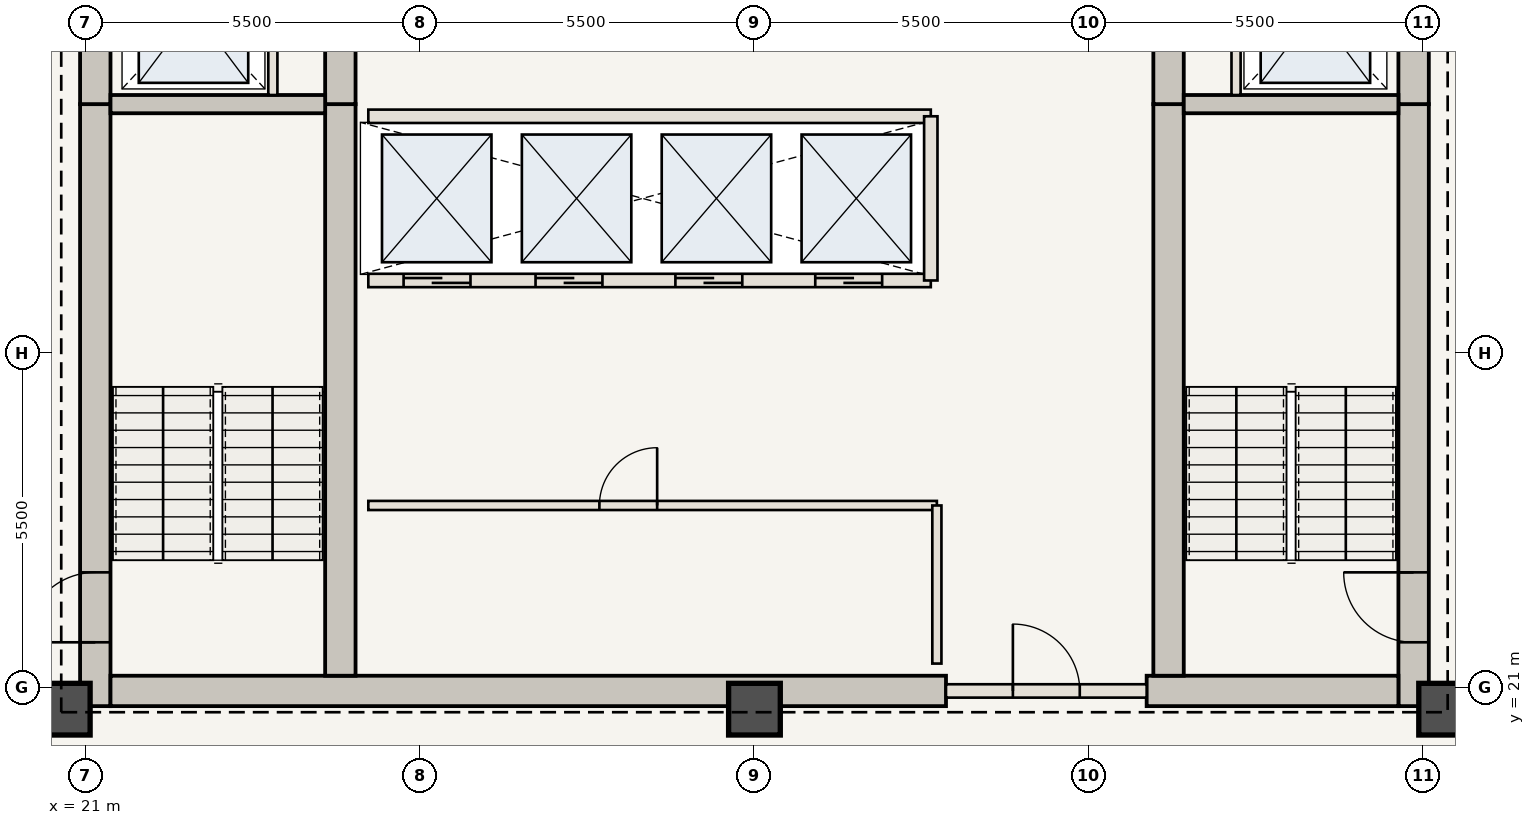
"""IFC4 building model, lengths in metres.
Left out: names, types, materials, properties, quantities, classifications, styles, units other than length and angle.
Written with IfcOpenShell. Run it as: python <this file> out.ifc"""

import sys

from ifc_helpers import new_model, si_unit, direction, frame, frame_2d, origin, origin_2d, place, context, subcontext, project, spatial, rectangle, extrude, element, fill, save


model = new_model("IFC4")
c1 = context("Model", 3, precision=1e-05, world=origin(), true_north=direction((0.0, 1.0)))
c2 = subcontext(c1, "Body", "Model", "MODEL_VIEW")
j1 = project(units=[si_unit("LENGTHUNIT", "METRE"), si_unit("PLANEANGLEUNIT", "RADIAN")], contexts=[c1])
p1 = place(None, origin())
s1 = spatial("IfcSite", under=j1, at=p1, CompositionType="ELEMENT")
p2 = place(p1, origin())
s2 = spatial("IfcBuilding", under=s1, at=p2, CompositionType="ELEMENT")
p3 = place(p2, frame((0.0, 0.0, 225.4)))
s3 = spatial("IfcBuildingStorey", under=s2, at=p3, CompositionType="ELEMENT", Elevation=225.4)
p4 = place(p3, frame((21.16, 20.7, 0.0), z_axis=(0.0, 0.0, 1.0), x_axis=(0.0, 1.0, 0.0)))
e1 = element("IfcWall", 1, at=p4, inside=s3, PredefinedType="SHEAR", context=c2, shape_type="SweptSolid", body=[
    extrude(rectangle(XDim=9.9, YDim=0.5, at=frame_2d((4.95, 0.0))), origin(), (0.0, 0.0, 1.0), 3.85),
])
p5 = place(p4, frame((1.05, 0.0, 0.0)))
e2 = element("IfcOpeningElement", 2, at=p5, cuts=e1, PredefinedType="OPENING", context=c2, shape_type="SweptSolid", body=[
    extrude(rectangle(XDim=1.15, YDim=2.15, at=frame_2d((0.575, 1.075))), frame((0.0, 0.26, 0.0), z_axis=(0.0, -1.0, 0.0), x_axis=(1.0, 0.0, 0.0)), (0.0, 0.0, 1.0), 0.52),
])
p6 = place(p3, frame((21.16, 30.6, 0.0), z_axis=(0.0, 0.0, 1.0), x_axis=(0.0, 1.0, 0.0)))
e3 = element("IfcWall", 3, at=p6, inside=s3, PredefinedType="SHEAR", context=c2, shape_type="SweptSolid", body=[
    extrude(rectangle(XDim=12.65, YDim=0.5, at=frame_2d((6.325, 0.0))), origin(), (0.0, 0.0, 1.0), 3.85),
])
p7 = place(p6, frame((4.2, 0.0, 0.0)))
e4 = element("IfcOpeningElement", 4, at=p7, cuts=e3, PredefinedType="OPENING", context=c2, shape_type="SweptSolid", body=[
    extrude(rectangle(XDim=1.1, YDim=2.15, at=frame_2d((0.55, 1.075))), frame((0.0, 0.26, 0.0), z_axis=(0.0, -1.0, 0.0), x_axis=(1.0, 0.0, 0.0)), (0.0, 0.0, 1.0), 0.52),
])
p8 = place(p6, frame((9.2, 0.0, 0.0)))
e5 = element("IfcOpeningElement", 5, at=p8, cuts=e3, PredefinedType="OPENING", context=c2, shape_type="SweptSolid", body=[
    extrude(rectangle(XDim=0.92, YDim=2.1, at=frame_2d((0.46, 1.05))), frame((0.0, 0.26, 0.0), z_axis=(0.0, -1.0, 0.0), x_axis=(1.0, 0.0, 0.0)), (0.0, 0.0, 1.0), 0.52),
])
p9 = place(p3, frame((42.84, 20.7, 0.0), z_axis=(0.0, 0.0, 1.0), x_axis=(0.0, 1.0, 0.0)))
e6 = element("IfcWall", 6, at=p9, inside=s3, PredefinedType="SHEAR", context=c2, shape_type="SweptSolid", body=[
    extrude(rectangle(XDim=9.9, YDim=0.5, at=frame_2d((4.95, 0.0))), origin(), (0.0, 0.0, 1.0), 3.85),
])
p10 = place(p9, frame((1.05, 0.0, 0.0)))
e7 = element("IfcOpeningElement", 7, at=p10, cuts=e6, PredefinedType="OPENING", context=c2, shape_type="SweptSolid", body=[
    extrude(rectangle(XDim=1.15, YDim=2.15, at=frame_2d((0.575, 1.075))), frame((0.0, 0.26, 0.0), z_axis=(0.0, -1.0, 0.0), x_axis=(1.0, 0.0, 0.0)), (0.0, 0.0, 1.0), 0.52),
])
p11 = place(p3, frame((42.84, 30.6, 0.0), z_axis=(0.0, 0.0, 1.0), x_axis=(0.0, 1.0, 0.0)))
e8 = element("IfcWall", 8, at=p11, inside=s3, PredefinedType="SHEAR", context=c2, shape_type="SweptSolid", body=[
    extrude(rectangle(XDim=12.65, YDim=0.5, at=frame_2d((6.325, 0.0))), origin(), (0.0, 0.0, 1.0), 3.85),
])
p12 = place(p11, frame((4.2, 0.0, 0.0)))
e9 = element("IfcOpeningElement", 9, at=p12, cuts=e8, PredefinedType="OPENING", context=c2, shape_type="SweptSolid", body=[
    extrude(rectangle(XDim=1.1, YDim=2.15, at=frame_2d((0.55, 1.075))), frame((0.0, 0.26, 0.0), z_axis=(0.0, -1.0, 0.0), x_axis=(1.0, 0.0, 0.0)), (0.0, 0.0, 1.0), 0.52),
])
p13 = place(p11, frame((8.05, 0.0, 0.0)))
e10 = element("IfcOpeningElement", 10, at=p13, cuts=e8, PredefinedType="OPENING", context=c2, shape_type="SweptSolid", body=[
    extrude(rectangle(XDim=0.88, YDim=2.1, at=frame_2d((0.44, 1.05))), frame((0.0, 0.26, 0.0), z_axis=(0.0, -1.0, 0.0), x_axis=(1.0, 0.0, 0.0)), (0.0, 0.0, 1.0), 0.52),
])
p14 = place(p11, frame((9.45, 0.0, 0.0)))
e11 = element("IfcOpeningElement", 11, at=p14, cuts=e8, PredefinedType="OPENING", context=c2, shape_type="SweptSolid", body=[
    extrude(rectangle(XDim=0.88, YDim=2.1, at=frame_2d((0.44, 1.05))), frame((0.0, 0.26, 0.0), z_axis=(0.0, -1.0, 0.0), x_axis=(1.0, 0.0, 0.0)), (0.0, 0.0, 1.0), 0.52),
])
p15 = place(p11, frame((10.85, 0.0, 0.0)))
e12 = element("IfcOpeningElement", 12, at=p15, cuts=e8, PredefinedType="OPENING", context=c2, shape_type="SweptSolid", body=[
    extrude(rectangle(XDim=0.88, YDim=2.1, at=frame_2d((0.44, 1.05))), frame((0.0, 0.26, 0.0), z_axis=(0.0, -1.0, 0.0), x_axis=(1.0, 0.0, 0.0)), (0.0, 0.0, 1.0), 0.52),
])
p16 = place(p3, frame((21.41, 20.95, 0.0), z_axis=(0.0, 0.0, 1.0), x_axis=(1.0, 0.0, 0.0)))
e13 = element("IfcWall", 13, at=p16, inside=s3, PredefinedType="SHEAR", context=c2, shape_type="SweptSolid", body=[
    extrude(rectangle(XDim=13.74, YDim=0.5, at=frame_2d((6.87, 0.0))), origin(), (0.0, 0.0, 1.0), 3.85),
])
p17 = place(p3, frame((38.45, 20.95, 0.0), z_axis=(0.0, 0.0, 1.0), x_axis=(1.0, 0.0, 0.0)))
e14 = element("IfcWall", 14, at=p17, inside=s3, PredefinedType="SHEAR", context=c2, shape_type="SweptSolid", body=[
    extrude(rectangle(XDim=4.14, YDim=0.5, at=frame_2d((2.07, 0.0))), origin(), (0.0, 0.0, 1.0), 3.85),
])
p18 = place(p3, frame((25.19, 21.2, 0.0), z_axis=(0.0, 0.0, 1.0), x_axis=(0.0, 1.0, 0.0)))
e15 = element("IfcWall", 15, at=p18, inside=s3, PredefinedType="SHEAR", context=c2, shape_type="SweptSolid", body=[
    extrude(rectangle(XDim=9.4, YDim=0.5, at=frame_2d((4.7, 0.0))), origin(), (0.0, 0.0, 1.0), 3.85),
])
p19 = place(p3, frame((25.19, 30.6, 0.0), z_axis=(0.0, 0.0, 1.0), x_axis=(0.0, 1.0, 0.0)))
e16 = element("IfcWall", 16, at=p19, inside=s3, PredefinedType="SHEAR", context=c2, shape_type="SweptSolid", body=[
    extrude(rectangle(XDim=12.15, YDim=0.5, at=frame_2d((6.075, 0.0))), origin(), (0.0, 0.0, 1.0), 3.85),
])
p20 = place(p19, frame((6.25, 0.0, 0.0)))
e17 = element("IfcOpeningElement", 17, at=p20, cuts=e16, PredefinedType="OPENING", context=c2, shape_type="SweptSolid", body=[
    extrude(rectangle(XDim=1.1, YDim=2.15, at=frame_2d((0.55, 1.075))), frame((0.0, 0.26, 0.0), z_axis=(0.0, -1.0, 0.0), x_axis=(1.0, 0.0, 0.0)), (0.0, 0.0, 1.0), 0.52),
])
p21 = place(p3, frame((38.81, 21.2, 0.0), z_axis=(0.0, 0.0, 1.0), x_axis=(0.0, 1.0, 0.0)))
e18 = element("IfcWall", 18, at=p21, inside=s3, PredefinedType="SHEAR", context=c2, shape_type="SweptSolid", body=[
    extrude(rectangle(XDim=9.4, YDim=0.5, at=frame_2d((4.7, 0.0))), origin(), (0.0, 0.0, 1.0), 3.85),
])
p22 = place(p3, frame((38.81, 30.6, 0.0), z_axis=(0.0, 0.0, 1.0), x_axis=(0.0, 1.0, 0.0)))
e19 = element("IfcWall", 19, at=p22, inside=s3, PredefinedType="SHEAR", context=c2, shape_type="SweptSolid", body=[
    extrude(rectangle(XDim=12.15, YDim=0.5, at=frame_2d((6.075, 0.0))), origin(), (0.0, 0.0, 1.0), 3.85),
])
for number, where, z_axis, x_axis in (
    (20, (20.65, 20.65, 0.0), (0.0, 0.0, 1.0), (1.0, 0.0, 0.0)),
    (21, (32.0, 20.65, 0.0), (0.0, 0.0, 1.0), (1.0, 0.0, 0.0)),
    (22, (43.35, 20.65, 0.0), (0.0, 0.0, 1.0), (1.0, 0.0, 0.0)),
):
    element("IfcColumn", number, at=place(p3, frame(where, z_axis=z_axis, x_axis=x_axis)), inside=s3, PredefinedType="COLUMN", context=c2, shape_type="SweptSolid", body=[
        extrude(rectangle(XDim=0.85, YDim=0.85, at=origin_2d()), origin(), (0.0, 0.0, 1.0), 3.85),
    ])
for number, where, z_axis, x_axis in (
    (23, (21.41, 30.6, 0.0), (0.0, 0.0, 1.0), (1.0, 0.0, 0.0)),
    (24, (39.06, 30.6, 0.0), (0.0, 0.0, 1.0), (1.0, 0.0, 0.0)),
):
    element("IfcWall", number, at=place(p3, frame(where, z_axis=z_axis, x_axis=x_axis)), inside=s3, PredefinedType="SHEAR", context=c2, shape_type="SweptSolid", body=[
        extrude(rectangle(XDim=3.53, YDim=0.3, at=frame_2d((1.765, 0.0))), origin(), (0.0, 0.0, 1.0), 3.685),
    ])
for number, where, z_axis, x_axis in (
    (25, (24.08, 30.75, 0.0), (0.0, 0.0, 1.0), (0.0, 1.0, 0.0)),
    (26, (39.92, 30.75, 0.0), (0.0, 0.0, 1.0), (0.0, 1.0, 0.0)),
):
    element("IfcWall", number, at=place(p3, frame(where, z_axis=z_axis, x_axis=x_axis)), inside=s3, PredefinedType="STANDARD", context=c2, shape_type="SweptSolid", body=[
        extrude(rectangle(XDim=2.65, YDim=0.15, at=frame_2d((1.325, 0.0))), origin(), (0.0, 0.0, 1.0), 3.685),
    ])
p23 = place(p3, frame((35.15, 20.95, 0.0), z_axis=(0.0, 0.0, 1.0), x_axis=(1.0, 0.0, 0.0)))
e27 = element("IfcWall", 27, at=p23, inside=s3, PredefinedType="STANDARD", context=c2, shape_type="SweptSolid", body=[
    extrude(rectangle(XDim=3.3, YDim=0.22, at=frame_2d((1.65, 0.0))), origin(), (0.0, 0.0, 1.0), 3.685),
])
p24 = place(p23, frame((1.1, 0.0, 0.0)))
e28 = element("IfcOpeningElement", 28, at=p24, cuts=e27, PredefinedType="OPENING", context=c2, shape_type="SweptSolid", body=[
    extrude(rectangle(XDim=1.1, YDim=2.15, at=frame_2d((0.55, 1.075))), frame((0.0, 0.12, 0.0), z_axis=(0.0, -1.0, 0.0), x_axis=(1.0, 0.0, 0.0)), (0.0, 0.0, 1.0), 0.24),
])
p25 = place(p3, frame((25.65, 24.0, 0.0), z_axis=(0.0, 0.0, 1.0), x_axis=(1.0, 0.0, 0.0)))
e29 = element("IfcWall", 29, at=p25, inside=s3, PredefinedType="STANDARD", context=c2, shape_type="SweptSolid", body=[
    extrude(rectangle(XDim=9.35, YDim=0.15, at=frame_2d((4.675, 0.0))), origin(), (0.0, 0.0, 1.0), 3.685),
])
p26 = place(p25, frame((3.8, 0.0, 0.0)))
e30 = element("IfcOpeningElement", 30, at=p26, cuts=e29, PredefinedType="OPENING", context=c2, shape_type="SweptSolid", body=[
    extrude(rectangle(XDim=0.95, YDim=2.15, at=frame_2d((0.475, 1.075))), frame((0.0, 0.085, 0.0), z_axis=(0.0, -1.0, 0.0), x_axis=(1.0, 0.0, 0.0)), (0.0, 0.0, 1.0), 0.17),
])
p27 = place(p3, frame((35.0, 21.4, 0.0), z_axis=(0.0, 0.0, 1.0), x_axis=(0.0, 1.0, 0.0)))
e31 = element("IfcWall", 31, at=p27, inside=s3, PredefinedType="STANDARD", context=c2, shape_type="SweptSolid", body=[
    extrude(rectangle(XDim=2.6, YDim=0.15, at=frame_2d((1.3, 0.0))), origin(), (0.0, 0.0, 1.0), 3.685),
])
p28 = place(p3, frame((25.65, 27.7, 0.0), z_axis=(0.0, 0.0, 1.0), x_axis=(1.0, 0.0, 0.0)))
e32 = element("IfcWall", 32, at=p28, inside=s3, PredefinedType="STANDARD", context=c2, shape_type="SweptSolid", body=[
    extrude(rectangle(XDim=9.25, YDim=0.22, at=frame_2d((4.625, 0.0))), origin(), (0.0, 0.0, 1.0), 3.685),
])
p29 = place(p28, frame((0.58, 0.0, 0.0)))
e33 = element("IfcOpeningElement", 33, at=p29, cuts=e32, PredefinedType="OPENING", context=c2, shape_type="SweptSolid", body=[
    extrude(rectangle(XDim=1.1, YDim=2.15, at=frame_2d((0.55, 1.075))), frame((0.0, 0.12, 0.0), z_axis=(0.0, -1.0, 0.0), x_axis=(1.0, 0.0, 0.0)), (0.0, 0.0, 1.0), 0.24),
])
p30 = place(p28, frame((2.75, 0.0, 0.0)))
e34 = element("IfcOpeningElement", 34, at=p30, cuts=e32, PredefinedType="OPENING", context=c2, shape_type="SweptSolid", body=[
    extrude(rectangle(XDim=1.1, YDim=2.15, at=frame_2d((0.55, 1.075))), frame((0.0, 0.12, 0.0), z_axis=(0.0, -1.0, 0.0), x_axis=(1.0, 0.0, 0.0)), (0.0, 0.0, 1.0), 0.24),
])
p31 = place(p28, frame((5.05, 0.0, 0.0)))
e35 = element("IfcOpeningElement", 35, at=p31, cuts=e32, PredefinedType="OPENING", context=c2, shape_type="SweptSolid", body=[
    extrude(rectangle(XDim=1.1, YDim=2.15, at=frame_2d((0.55, 1.075))), frame((0.0, 0.12, 0.0), z_axis=(0.0, -1.0, 0.0), x_axis=(1.0, 0.0, 0.0)), (0.0, 0.0, 1.0), 0.24),
])
p32 = place(p28, frame((7.35, 0.0, 0.0)))
e36 = element("IfcOpeningElement", 36, at=p32, cuts=e32, PredefinedType="OPENING", context=c2, shape_type="SweptSolid", body=[
    extrude(rectangle(XDim=1.1, YDim=2.15, at=frame_2d((0.55, 1.075))), frame((0.0, 0.12, 0.0), z_axis=(0.0, -1.0, 0.0), x_axis=(1.0, 0.0, 0.0)), (0.0, 0.0, 1.0), 0.24),
])
p33 = place(p3, frame((25.65, 30.4, 0.0), z_axis=(0.0, 0.0, 1.0), x_axis=(1.0, 0.0, 0.0)))
e37 = element("IfcWall", 37, at=p33, inside=s3, PredefinedType="STANDARD", context=c2, shape_type="SweptSolid", body=[
    extrude(rectangle(XDim=9.25, YDim=0.22, at=frame_2d((4.625, 0.0))), origin(), (0.0, 0.0, 1.0), 3.685),
])
p34 = place(p3, frame((34.9, 27.7, 0.0), z_axis=(0.0, 0.0, 1.0), x_axis=(0.0, 1.0, 0.0)))
e38 = element("IfcWall", 38, at=p34, inside=s3, PredefinedType="STANDARD", context=c2, shape_type="SweptSolid", body=[
    extrude(rectangle(XDim=2.7, YDim=0.22, at=frame_2d((1.35, 0.0))), origin(), (0.0, 0.0, 1.0), 3.685),
])
p35 = place(p5, origin())
e39 = element("IfcDoor", 39, at=p35, inside=s3, OperationType="SINGLE_SWING_LEFT", PredefinedType="DOOR", context=c2, shape_type="SweptSolid", body=[
    extrude(rectangle(XDim=1.15, YDim=2.15, at=frame_2d((0.575, 1.075))), frame((0.0, 0.025, 0.0), z_axis=(0.0, -1.0, 0.0), x_axis=(1.0, 0.0, 0.0)), (0.0, 0.0, 1.0), 0.05),
])
fill(e2, e39)
p36 = place(p10, origin())
e40 = element("IfcDoor", 40, at=p36, inside=s3, OperationType="SINGLE_SWING_RIGHT", PredefinedType="DOOR", context=c2, shape_type="SweptSolid", body=[
    extrude(rectangle(XDim=1.15, YDim=2.15, at=frame_2d((0.575, 1.075))), frame((0.0, 0.025, 0.0), z_axis=(0.0, -1.0, 0.0), x_axis=(1.0, 0.0, 0.0)), (0.0, 0.0, 1.0), 0.05),
])
fill(e7, e40)
p37 = place(p24, origin())
e41 = element("IfcDoor", 41, at=p37, inside=s3, OperationType="SINGLE_SWING_LEFT", PredefinedType="DOOR", context=c2, shape_type="SweptSolid", body=[
    extrude(rectangle(XDim=1.1, YDim=2.15, at=frame_2d((0.55, 1.075))), frame((0.0, 0.025, 0.0), z_axis=(0.0, -1.0, 0.0), x_axis=(1.0, 0.0, 0.0)), (0.0, 0.0, 1.0), 0.05),
])
fill(e28, e41)
p38 = place(p26, origin())
e42 = element("IfcDoor", 42, at=p38, inside=s3, OperationType="SINGLE_SWING_RIGHT", PredefinedType="DOOR", context=c2, shape_type="SweptSolid", body=[
    extrude(rectangle(XDim=0.95, YDim=2.15, at=frame_2d((0.475, 1.075))), frame((0.0, 0.025, 0.0), z_axis=(0.0, -1.0, 0.0), x_axis=(1.0, 0.0, 0.0)), (0.0, 0.0, 1.0), 0.05),
])
fill(e30, e42)
p39 = place(p29, origin())
e43 = element("IfcDoor", 43, at=p39, inside=s3, OperationType="DOUBLE_DOOR_SLIDING", PredefinedType="DOOR", context=c2, shape_type="SweptSolid", body=[
    extrude(rectangle(XDim=1.1, YDim=2.15, at=frame_2d((0.55, 1.075))), frame((0.0, 0.025, 0.0), z_axis=(0.0, -1.0, 0.0), x_axis=(1.0, 0.0, 0.0)), (0.0, 0.0, 1.0), 0.05),
])
fill(e33, e43)
p40 = place(p30, origin())
e44 = element("IfcDoor", 44, at=p40, inside=s3, OperationType="DOUBLE_DOOR_SLIDING", PredefinedType="DOOR", context=c2, shape_type="SweptSolid", body=[
    extrude(rectangle(XDim=1.1, YDim=2.15, at=frame_2d((0.55, 1.075))), frame((0.0, 0.025, 0.0), z_axis=(0.0, -1.0, 0.0), x_axis=(1.0, 0.0, 0.0)), (0.0, 0.0, 1.0), 0.05),
])
fill(e34, e44)
p41 = place(p31, origin())
e45 = element("IfcDoor", 45, at=p41, inside=s3, OperationType="DOUBLE_DOOR_SLIDING", PredefinedType="DOOR", context=c2, shape_type="SweptSolid", body=[
    extrude(rectangle(XDim=1.1, YDim=2.15, at=frame_2d((0.55, 1.075))), frame((0.0, 0.025, 0.0), z_axis=(0.0, -1.0, 0.0), x_axis=(1.0, 0.0, 0.0)), (0.0, 0.0, 1.0), 0.05),
])
fill(e35, e45)
p42 = place(p32, origin())
e46 = element("IfcDoor", 46, at=p42, inside=s3, OperationType="DOUBLE_DOOR_SLIDING", PredefinedType="DOOR", context=c2, shape_type="SweptSolid", body=[
    extrude(rectangle(XDim=1.1, YDim=2.15, at=frame_2d((0.55, 1.075))), frame((0.0, 0.025, 0.0), z_axis=(0.0, -1.0, 0.0), x_axis=(1.0, 0.0, 0.0)), (0.0, 0.0, 1.0), 0.05),
])
fill(e36, e46)
save(model, sys.argv[1])
